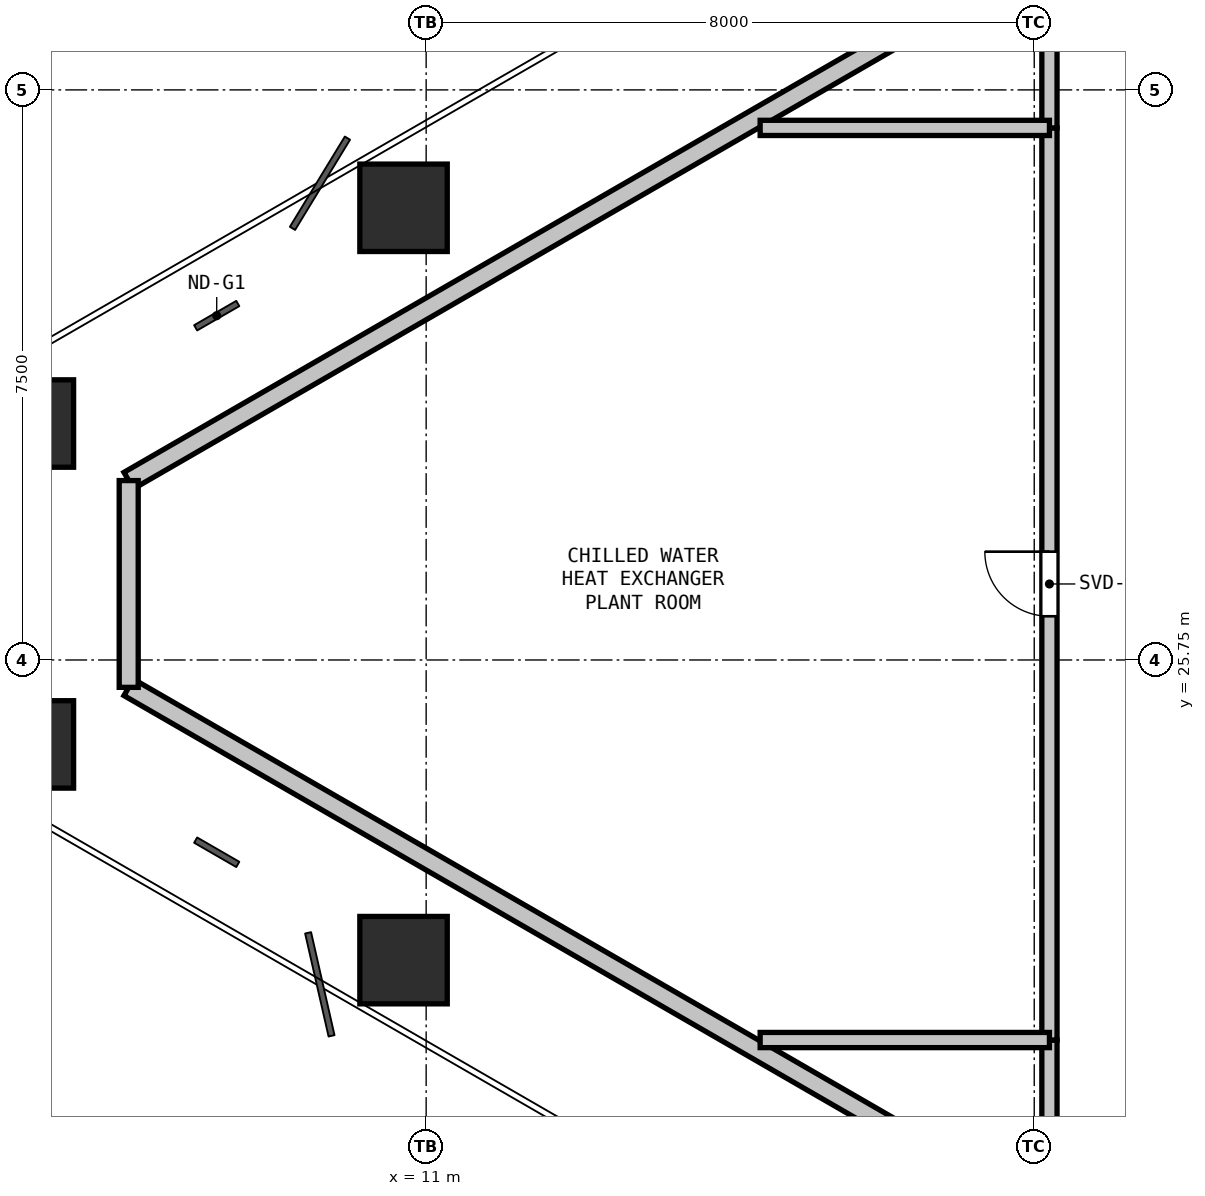
"""IFC4 building model, lengths in metres.
Left out: names, types, materials, properties, quantities, classifications, styles, units other than length and angle.
Written with IfcOpenShell. Run it as: python <this file> out.ifc"""

import sys

from ifc_helpers import new_model, si_unit, direction, frame, frame_2d, origin, origin_2d, place, context, subcontext, project, spatial, rectangle, hollow_rectangle, extrude, element, fill, save


model = new_model("IFC4")
c1 = context("Model", 3, precision=1e-05, world=origin(), true_north=direction((0.0, 1.0)))
c2 = subcontext(c1, "Body", "Model", "MODEL_VIEW")
j1 = project(units=[si_unit("LENGTHUNIT", "METRE"), si_unit("PLANEANGLEUNIT", "RADIAN")], contexts=[c1])
p1 = place(None, origin())
s1 = spatial("IfcSite", under=j1, at=p1, CompositionType="ELEMENT")
p2 = place(p1, origin())
s2 = spatial("IfcBuilding", under=s1, at=p2, CompositionType="ELEMENT")
p3 = place(p2, frame((0.0, 0.0, 66.9)))
s3 = spatial("IfcBuildingStorey", under=s2, at=p3, CompositionType="ELEMENT", Elevation=66.9)
for number, where, z_axis, x_axis in (
    (1, (5.787, 28.861, -0.32), (0.0, 0.0, 1.0), (1.0, 0.0, 0.0)),
    (2, (10.702, 31.699, -0.32), (0.0, 0.0, 1.0), (1.0, 0.0, 0.0)),
    (3, (10.702, 21.801, -0.32), (0.0, 0.0, 1.0), (1.0, 0.0, 0.0)),
    (4, (5.787, 24.639, -0.32), (0.0, 0.0, 1.0), (1.0, 0.0, 0.0)),
):
    element("IfcColumn", number, at=place(p3, frame(where, z_axis=z_axis, x_axis=x_axis)), inside=s3, PredefinedType="COLUMN", context=c2, shape_type="SweptSolid", body=[
        extrude(hollow_rectangle(XDim=1.15, YDim=1.15, WallThickness=0.032, at=origin_2d()), origin(), (0.0, 0.0, 1.0), 6.92),
    ])
for number, where, z_axis, x_axis in (
    (5, (7.087, 28.11, 0.0), (0.0, 0.0, 1.0), (0.866, 0.5, 0.0)),
    (6, (38.779, 7.092, 0.0), (0.0, 0.0, 1.0), (-0.866, 0.5, 0.0)),
):
    element("IfcWall", number, at=place(p3, frame(where, z_axis=z_axis, x_axis=x_axis)), inside=s3, PredefinedType="SOLIDWALL", context=c2, shape_type="SweptSolid", body=[
        extrude(rectangle(XDim=36.595, YDim=0.25, at=frame_2d((18.297, 0.0))), origin(), (0.0, 0.0, 1.0), 5.723),
    ])
p4 = place(p3, frame((7.087, 25.39, 0.0), z_axis=(0.0, 0.0, 1.0), x_axis=(0.0, 1.0, 0.0)))
e7 = element("IfcWall", 7, at=p4, inside=s3, PredefinedType="SOLIDWALL", context=c2, shape_type="SweptSolid", body=[
    extrude(rectangle(XDim=2.72, YDim=0.25, at=frame_2d((1.36, 0.0))), origin(), (0.0, 0.0, 1.0), 6.35),
])
p5 = place(p3, frame((19.2, 18.568, 0.0), z_axis=(0.0, 0.0, 1.0), x_axis=(0.0, 1.0, 0.0)))
e8 = element("IfcWall", 8, at=p5, inside=s3, PredefinedType="PARTITIONING", context=c2, shape_type="SweptSolid", body=[
    extrude(rectangle(XDim=2.182, YDim=0.2, at=frame_2d((1.091, 0.0))), origin(), (0.0, 0.0, 1.0), 6.35),
])
p6 = place(p3, frame((19.2, 20.75, 0.0), z_axis=(0.0, 0.0, 1.0), x_axis=(0.0, 1.0, 0.0)))
e9 = element("IfcWall", 9, at=p6, inside=s3, PredefinedType="PARTITIONING", context=c2, shape_type="SweptSolid", body=[
    extrude(rectangle(XDim=12.0, YDim=0.2, at=frame_2d((6.0, 0.0))), origin(), (0.0, 0.0, 1.0), 5.723),
])
p7 = place(p6, frame((5.575, 0.0, 0.0)))
e10 = element("IfcOpeningElement", 10, at=p7, cuts=e9, PredefinedType="OPENING", context=c2, shape_type="SweptSolid", body=[
    extrude(rectangle(XDim=0.85, YDim=2.1, at=frame_2d((0.425, 1.05))), frame((0.0, 0.11, 0.0), z_axis=(0.0, -1.0, 0.0), x_axis=(1.0, 0.0, 0.0)), (0.0, 0.0, 1.0), 0.22),
])
p8 = place(p3, frame((19.2, 32.75, 0.0), z_axis=(0.0, 0.0, 1.0), x_axis=(0.0, 1.0, 0.0)))
e11 = element("IfcWall", 11, at=p8, inside=s3, PredefinedType="PARTITIONING", context=c2, shape_type="SweptSolid", body=[
    extrude(rectangle(XDim=2.182, YDim=0.2, at=frame_2d((1.091, 0.0))), origin(), (0.0, 0.0, 1.0), 5.723),
])
p9 = place(p3, frame((15.394, 32.75, 0.0), z_axis=(0.0, 0.0, 1.0), x_axis=(1.0, 0.0, 0.0)))
e12 = element("IfcWall", 12, at=p9, inside=s3, PredefinedType="PARTITIONING", context=c2, shape_type="SweptSolid", body=[
    extrude(rectangle(XDim=3.806, YDim=0.2, at=frame_2d((1.903, 0.0))), origin(), (0.0, 0.0, 1.0), 5.723),
])
p10 = place(p3, frame((19.2, 20.75, 0.0), z_axis=(0.0, 0.0, 1.0), x_axis=(-1.0, 0.0, 0.0)))
e13 = element("IfcWall", 13, at=p10, inside=s3, PredefinedType="PARTITIONING", context=c2, shape_type="SweptSolid", body=[
    extrude(rectangle(XDim=3.806, YDim=0.2, at=frame_2d((1.903, 0.0))), origin(), (0.0, 0.0, 1.0), 6.35),
])
p11 = place(p7, origin())
e14 = element("IfcDoor", 14, at=p11, inside=s3, OperationType="SINGLE_SWING_RIGHT", PredefinedType="DOOR", context=c2, shape_type="SweptSolid", body=[
    extrude(rectangle(XDim=0.85, YDim=2.1, at=frame_2d((0.425, 1.05))), frame((0.0, 0.025, 0.0), z_axis=(0.0, -1.0, 0.0), x_axis=(1.0, 0.0, 0.0)), (0.0, 0.0, 1.0), 0.05),
])
fill(e10, e14)
save(model, sys.argv[1])
